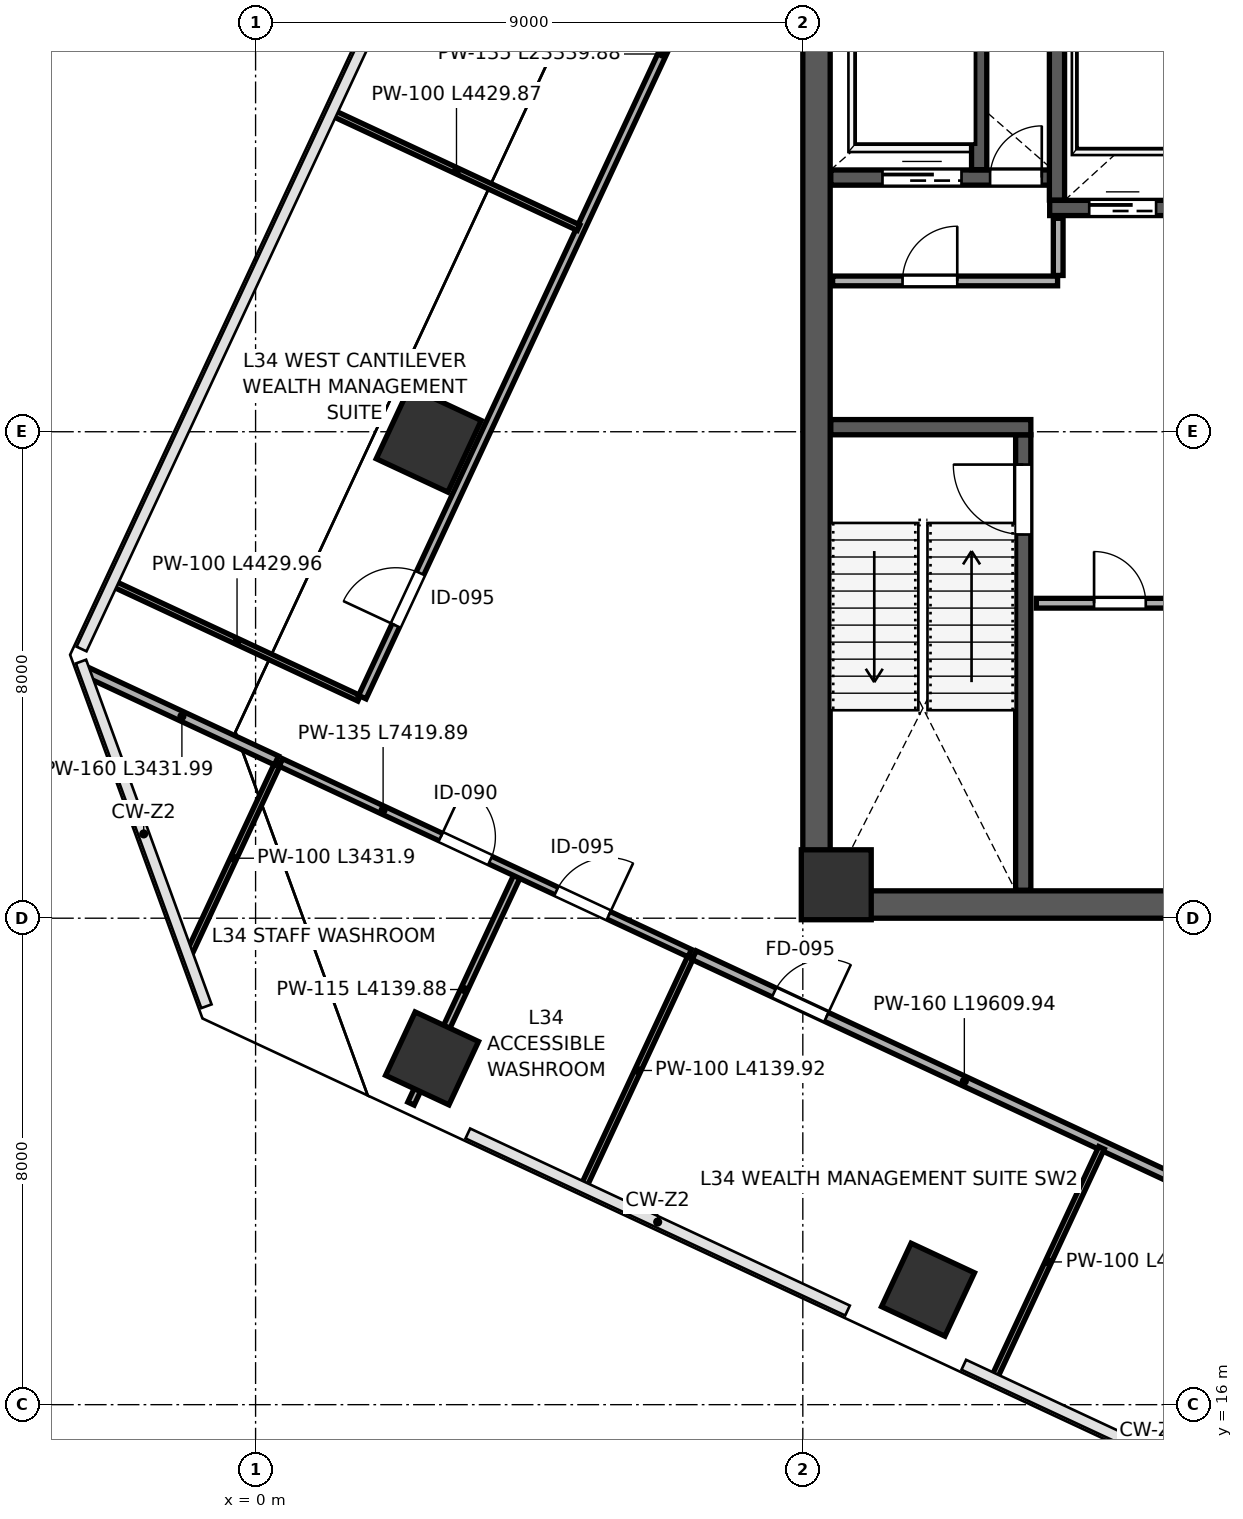
"""IFC4 building model, lengths in metres.
Left out: names, types, materials, properties, quantities, classifications, styles, units other than length and angle.
Written with IfcOpenShell. Run it as: python <this file> out.ifc"""

import sys

from ifc_helpers import new_model, si_unit, direction, frame, frame_2d, origin, origin_2d, place, context, subcontext, project, spatial, rectangle, extrude, source, transform, mapped, element, fill, save


model = new_model("IFC4")
c1 = context("Model", 3, precision=1e-05, world=origin(), true_north=direction((0.0, 1.0)))
c2 = subcontext(c1, "Body", "Model", "MODEL_VIEW")
j1 = project(units=[si_unit("LENGTHUNIT", "METRE"), si_unit("PLANEANGLEUNIT", "RADIAN")], contexts=[c1])
p1 = place(None, origin())
s1 = spatial("IfcSite", under=j1, at=p1, CompositionType="ELEMENT")
p2 = place(p1, origin())
s2 = spatial("IfcBuilding", under=s1, at=p2, CompositionType="ELEMENT")
p3 = place(p2, frame((0.0, 0.0, 154.0)))
s3 = spatial("IfcBuildingStorey", under=s2, at=p3, CompositionType="ELEMENT", Elevation=154.0)
m1 = source(origin(), c2, "Body", "SweptSolid", [
    extrude(rectangle(XDim=1.15, YDim=1.15, at=origin_2d()), origin(), (0.0, 0.0, 1.0), 4.198),
])
p4 = place(p3, frame((9.55, 24.55, 0.001), z_axis=(0.0, 0.0, 1.0), x_axis=(1.0, 0.0, 0.0)))
e1 = element("IfcColumn", 1, at=p4, inside=s3, PredefinedType="COLUMN", context=c2, shape_type="MappedRepresentation", body=[
    mapped(m1, transform((0.0, 0.0, 0.0), scale=1.0)),
])
m2 = source(origin(), c2, "Body", "SweptSolid", [
    extrude(rectangle(XDim=1.15, YDim=1.15, at=origin_2d()), origin(), (0.0, 0.0, 1.0), 4.198),
])
for number, where, z_axis, x_axis in (
    (2, (2.902, 21.694, 0.001), (0.0, 0.0, 1.0), (-0.906, 0.423, 0.0)),
    (3, (11.059, 17.891, 0.001), (0.0, 0.0, 1.0), (-0.906, 0.423, 0.0)),
):
    element("IfcColumn", number, at=place(p3, frame(where, z_axis=z_axis, x_axis=x_axis)), inside=s3, PredefinedType="COLUMN", context=c2, shape_type="MappedRepresentation", body=[
        mapped(m2, transform((0.0, 0.0, 0.0), scale=1.0)),
    ])
m3 = source(origin(), c2, "Body", "SweptSolid", [
    extrude(rectangle(XDim=1.3, YDim=1.3, at=origin_2d()), origin(), (0.0, 0.0, 1.0), 4.198),
])
p5 = place(p3, frame((2.848, 31.871, 0.001), z_axis=(0.0, 0.0, 1.0), x_axis=(-0.906307787037, 0.422618261741, 0.0)))
e4 = element("IfcColumn", 4, at=p5, inside=s3, PredefinedType="COLUMN", context=c2, shape_type="MappedRepresentation", body=[
    mapped(m3, transform((0.0, 0.0, 0.0), scale=1.0)),
])
p6 = place(p3, frame((9.225, 24.45, 0.0), z_axis=(0.0, 0.0, 1.0), x_axis=(0.0, 1.0, 0.0)))
e5 = element("IfcWall", 5, at=p6, inside=s3, PredefinedType="SHEAR", context=c2, shape_type="SweptSolid", body=[
    extrude(rectangle(XDim=15.1, YDim=0.45, at=frame_2d((7.55, 0.0))), origin(), (0.0, 0.0, 1.0), 3.96),
])
p7 = place(p3, frame((9.0, 24.225, 0.0), z_axis=(0.0, 0.0, 1.0), x_axis=(1.0, 0.0, 0.0)))
e6 = element("IfcWall", 6, at=p7, inside=s3, PredefinedType="SHEAR", context=c2, shape_type="SweptSolid", body=[
    extrude(rectangle(XDim=18.0, YDim=0.45, at=frame_2d((9.0, 0.0))), origin(), (0.0, 0.0, 1.0), 3.96),
])
p8 = place(p3, frame((12.625, 24.46, 0.0), z_axis=(0.0, 0.0, 1.0), x_axis=(0.0, 1.0, 0.0)))
e7 = element("IfcWall", 7, at=p8, inside=s3, PredefinedType="SHEAR", context=c2, shape_type="SweptSolid", body=[
    extrude(rectangle(XDim=7.49, YDim=0.25, at=frame_2d((3.745, 0.0))), origin(), (0.0, 0.0, 1.0), 3.96),
])
p9 = place(p8, frame((5.85, 0.0, 0.0)))
e8 = element("IfcOpeningElement", 8, at=p9, cuts=e7, PredefinedType="OPENING", context=c2, shape_type="SweptSolid", body=[
    extrude(rectangle(XDim=1.15, YDim=2.2, at=frame_2d((0.575, 1.1))), frame((0.0, 0.135, 0.0), z_axis=(0.0, -1.0, 0.0), x_axis=(1.0, 0.0, 0.0)), (0.0, 0.0, 1.0), 0.27),
])
p10 = place(p3, frame((9.46, 32.075, 0.0), z_axis=(0.0, 0.0, 1.0), x_axis=(1.0, 0.0, 0.0)))
e9 = element("IfcWall", 9, at=p10, inside=s3, PredefinedType="SHEAR", context=c2, shape_type="SweptSolid", body=[
    extrude(rectangle(XDim=3.29, YDim=0.25, at=frame_2d((1.645, 0.0))), origin(), (0.0, 0.0, 1.0), 3.96),
])
p11 = place(p3, frame((9.46, 36.18, 0.0), z_axis=(0.0, 0.0, 1.0), x_axis=(1.0, 0.0, 0.0)))
e10 = element("IfcWall", 10, at=p11, inside=s3, PredefinedType="SHEAR", context=c2, shape_type="SweptSolid", body=[
    extrude(rectangle(XDim=3.79, YDim=0.25, at=frame_2d((1.895, 0.0))), origin(), (0.0, 0.0, 1.0), 3.96),
])
p12 = place(p11, frame((2.62, 0.0, 0.0)))
e11 = element("IfcOpeningElement", 11, at=p12, cuts=e10, PredefinedType="OPENING", context=c2, shape_type="SweptSolid", body=[
    extrude(rectangle(XDim=0.85, YDim=2.1, at=frame_2d((0.425, 1.05))), frame((0.0, 0.135, 0.0), z_axis=(0.0, -1.0, 0.0), x_axis=(1.0, 0.0, 0.0)), (0.0, 0.0, 1.0), 0.27),
])
p13 = place(p11, frame((0.85, 0.0, 0.0)))
e12 = element("IfcOpeningElement", 12, at=p13, cuts=e10, PredefinedType="OPENING", context=c2, shape_type="SweptSolid", body=[
    extrude(rectangle(XDim=1.3, YDim=2.25, at=frame_2d((0.65, 1.125))), frame((0.0, 0.135, 0.0), z_axis=(0.0, -1.0, 0.0), x_axis=(1.0, 0.0, 0.0)), (0.0, 0.0, 1.0), 0.27),
])
p14 = place(p3, frame((11.9, 36.31, 0.0), z_axis=(0.0, 0.0, 1.0), x_axis=(0.0, 1.0, 0.0)))
e13 = element("IfcWall", 13, at=p14, inside=s3, PredefinedType="SHEAR", context=c2, shape_type="SweptSolid", body=[
    extrude(rectangle(XDim=3.23, YDim=0.25, at=frame_2d((1.615, 0.0))), origin(), (0.0, 0.0, 1.0), 3.96),
])
p15 = place(p3, frame((13.06, 35.68, 0.0), z_axis=(0.0, 0.0, 1.0), x_axis=(1.0, 0.0, 0.0)))
e14 = element("IfcWall", 14, at=p15, inside=s3, PredefinedType="SHEAR", context=c2, shape_type="SweptSolid", body=[
    extrude(rectangle(XDim=4.25, YDim=0.25, at=frame_2d((2.125, 0.0))), origin(), (0.0, 0.0, 1.0), 3.96),
])
p16 = place(p15, frame((0.65, 0.0, 0.0)))
e15 = element("IfcOpeningElement", 15, at=p16, cuts=e14, PredefinedType="OPENING", context=c2, shape_type="SweptSolid", body=[
    extrude(rectangle(XDim=1.1, YDim=2.2, at=frame_2d((0.55, 1.1))), frame((0.0, 0.135, 0.0), z_axis=(0.0, -1.0, 0.0), x_axis=(1.0, 0.0, 0.0)), (0.0, 0.0, 1.0), 0.27),
])
p17 = place(p15, frame((2.65, 0.0, 0.0)))
e16 = element("IfcOpeningElement", 16, at=p17, cuts=e14, PredefinedType="OPENING", context=c2, shape_type="SweptSolid", body=[
    extrude(rectangle(XDim=1.1, YDim=2.2, at=frame_2d((0.55, 1.1))), frame((0.0, 0.135, 0.0), z_axis=(0.0, -1.0, 0.0), x_axis=(1.0, 0.0, 0.0)), (0.0, 0.0, 1.0), 0.27),
])
p18 = place(p3, frame((13.18, 35.81, 0.0), z_axis=(0.0, 0.0, 1.0), x_axis=(0.0, 1.0, 0.0)))
e17 = element("IfcWall", 17, at=p18, inside=s3, PredefinedType="SHEAR", context=c2, shape_type="SweptSolid", body=[
    extrude(rectangle(XDim=3.73, YDim=0.25, at=frame_2d((1.865, 0.0))), origin(), (0.0, 0.0, 1.0), 3.96),
])
p19 = place(p3, frame((9.49, 34.48, 0.0), z_axis=(0.0, 0.0, 1.0), x_axis=(1.0, 0.0, 0.0)))
e18 = element("IfcWall", 18, at=p19, inside=s3, PredefinedType="PARTITIONING", context=c2, shape_type="SweptSolid", body=[
    extrude(rectangle(XDim=3.7, YDim=0.16, at=frame_2d((1.85, 0.0))), origin(), (0.0, 0.0, 1.0), 3.96),
])
p20 = place(p19, frame((1.15, 0.0, 0.0)))
e19 = element("IfcOpeningElement", 19, at=p20, cuts=e18, PredefinedType="OPENING", context=c2, shape_type="SweptSolid", body=[
    extrude(rectangle(XDim=0.9, YDim=2.15, at=frame_2d((0.45, 1.075))), frame((0.0, 0.09, 0.0), z_axis=(0.0, -1.0, 0.0), x_axis=(1.0, 0.0, 0.0)), (0.0, 0.0, 1.0), 0.18),
])
p21 = place(p3, frame((13.2, 34.57, 0.0), z_axis=(0.0, 0.0, 1.0), x_axis=(0.0, 1.0, 0.0)))
e20 = element("IfcWall", 20, at=p21, inside=s3, PredefinedType="PARTITIONING", context=c2, shape_type="SweptSolid", body=[
    extrude(rectangle(XDim=0.94, YDim=0.16, at=frame_2d((0.47, 0.0))), origin(), (0.0, 0.0, 1.0), 3.96),
])
p22 = place(p3, frame((12.84, 29.18, 0.0), z_axis=(0.0, 0.0, 1.0), x_axis=(1.0, 0.0, 0.0)))
e21 = element("IfcWall", 21, at=p22, inside=s3, PredefinedType="PARTITIONING", context=c2, shape_type="SweptSolid", body=[
    extrude(rectangle(XDim=8.37, YDim=0.16, at=frame_2d((4.185, 0.0))), origin(), (0.0, 0.0, 1.0), 3.96),
])
p23 = place(p22, frame((0.95, 0.0, 0.0)))
e22 = element("IfcOpeningElement", 22, at=p23, cuts=e21, PredefinedType="OPENING", context=c2, shape_type="SweptSolid", body=[
    extrude(rectangle(XDim=0.85, YDim=2.1, at=frame_2d((0.425, 1.05))), frame((0.0, 0.09, 0.0), z_axis=(0.0, -1.0, 0.0), x_axis=(1.0, 0.0, 0.0)), (0.0, 0.0, 1.0), 0.18),
])
p24 = place(p22, frame((4.2, 0.0, 0.0)))
e23 = element("IfcOpeningElement", 23, at=p24, cuts=e21, PredefinedType="OPENING", context=c2, shape_type="SweptSolid", body=[
    extrude(rectangle(XDim=0.85, YDim=2.1, at=frame_2d((0.425, 1.05))), frame((0.0, 0.09, 0.0), z_axis=(0.0, -1.0, 0.0), x_axis=(1.0, 0.0, 0.0)), (0.0, 0.0, 1.0), 0.18),
])
p25 = place(p3, frame((-1.088, 23.431, 0.0), z_axis=(0.0, 0.0, 1.0), x_axis=(0.422632310917, 0.906301235665, 0.0)))
e24 = element("IfcWall", 24, at=p25, inside=s3, PredefinedType="PARTITIONING", context=c2, shape_type="SweptSolid", body=[
    extrude(rectangle(XDim=3.432, YDim=0.1, at=frame_2d((1.716, 0.0))), origin(), (0.0, 0.0, 1.0), 3.96),
])
p26 = place(p3, frame((-2.767, 28.045, 0.0), z_axis=(0.0, 0.0, 1.0), x_axis=(0.906313941013, -0.422605064246, 0.0)))
e25 = element("IfcWall", 25, at=p26, inside=s3, PredefinedType="PARTITIONING", context=c2, shape_type="SweptSolid", body=[
    extrude(rectangle(XDim=3.432, YDim=0.16, at=frame_2d((1.716, 0.0))), origin(), (0.0, 0.0, 1.0), 3.96),
])
p27 = place(p3, frame((2.556, 20.951, 0.0), z_axis=(0.0, 0.0, 1.0), x_axis=(0.422607794095, 0.906312668106, 0.0)))
e26 = element("IfcWall", 26, at=p27, inside=s3, PredefinedType="PARTITIONING", context=c2, shape_type="SweptSolid", body=[
    extrude(rectangle(XDim=4.14, YDim=0.115, at=frame_2d((2.07, 0.0))), origin(), (0.0, 0.0, 1.0), 3.195),
])
p28 = place(p3, frame((5.41, 19.62, 0.0), z_axis=(0.0, 0.0, 1.0), x_axis=(0.422656233697, 0.906290079454, 0.0)))
e27 = element("IfcWall", 27, at=p28, inside=s3, PredefinedType="PARTITIONING", context=c2, shape_type="SweptSolid", body=[
    extrude(rectangle(XDim=4.14, YDim=0.1, at=frame_2d((2.07, 0.0))), origin(), (0.0, 0.0, 1.0), 3.195),
])
p29 = place(p3, frame((0.416, 26.561, 0.0), z_axis=(0.0, 0.0, 1.0), x_axis=(0.906307511488, -0.422618852656, 0.0)))
e28 = element("IfcWall", 28, at=p29, inside=s3, PredefinedType="PARTITIONING", context=c2, shape_type="SweptSolid", body=[
    extrude(rectangle(XDim=7.42, YDim=0.135, at=frame_2d((3.71, 0.0))), origin(), (0.0, 0.0, 1.0), 3.96),
])
p30 = place(p29, frame((2.9, 0.0, 0.0)))
e29 = element("IfcOpeningElement", 29, at=p30, cuts=e28, PredefinedType="OPENING", context=c2, shape_type="SweptSolid", body=[
    extrude(rectangle(XDim=0.9, YDim=2.15, at=frame_2d((0.45, 1.075))), frame((0.0, 0.078, 0.0), z_axis=(0.0, -1.0, 0.0), x_axis=(1.0, 0.0, 0.0)), (0.0, 0.0, 1.0), 0.155),
])
p31 = place(p29, frame((5.0, 0.0, 0.0)))
e30 = element("IfcOpeningElement", 30, at=p31, cuts=e28, PredefinedType="OPENING", context=c2, shape_type="SweptSolid", body=[
    extrude(rectangle(XDim=0.95, YDim=2.15, at=frame_2d((0.475, 1.075))), frame((0.0, 0.078, 0.0), z_axis=(0.0, -1.0, 0.0), x_axis=(1.0, 0.0, 0.0)), (0.0, 0.0, 1.0), 0.155),
])
p32 = place(p3, frame((7.213, 23.391, 0.0), z_axis=(0.0, 0.0, 1.0), x_axis=(0.906304602938, -0.422625089996, 0.0)))
e31 = element("IfcWall", 31, at=p32, inside=s3, PredefinedType="PARTITIONING", context=c2, shape_type="SweptSolid", body=[
    extrude(rectangle(XDim=19.61, YDim=0.16, at=frame_2d((9.805, 0.0))), origin(), (0.0, 0.0, 1.0), 3.96),
])
p33 = place(p32, frame((1.45, 0.0, 0.0)))
e32 = element("IfcOpeningElement", 32, at=p33, cuts=e31, PredefinedType="OPENING", context=c2, shape_type="SweptSolid", body=[
    extrude(rectangle(XDim=0.95, YDim=2.15, at=frame_2d((0.475, 1.075))), frame((0.0, 0.09, 0.0), z_axis=(0.0, -1.0, 0.0), x_axis=(1.0, 0.0, 0.0)), (0.0, 0.0, 1.0), 0.18),
])
p34 = place(p32, frame((8.7, 0.0, 0.0)))
e33 = element("IfcOpeningElement", 33, at=p34, cuts=e31, PredefinedType="OPENING", context=c2, shape_type="SweptSolid", body=[
    extrude(rectangle(XDim=0.95, YDim=2.15, at=frame_2d((0.475, 1.075))), frame((0.0, 0.09, 0.0), z_axis=(0.0, -1.0, 0.0), x_axis=(1.0, 0.0, 0.0)), (0.0, 0.0, 1.0), 0.18),
])
p35 = place(p3, frame((12.162, 16.471, 0.0), z_axis=(0.0, 0.0, 1.0), x_axis=(0.422656233697, 0.906290079454, 0.0)))
e34 = element("IfcWall", 34, at=p35, inside=s3, PredefinedType="PARTITIONING", context=c2, shape_type="SweptSolid", body=[
    extrude(rectangle(XDim=4.14, YDim=0.1, at=frame_2d((2.07, 0.0))), origin(), (0.0, 0.0, 1.0), 3.195),
])
p36 = place(p3, frame((11.673, 48.808, 0.0), z_axis=(0.0, 0.0, 1.0), x_axis=(0.906307085664, -0.422619765836, 0.0)))
e35 = element("IfcWall", 35, at=p36, inside=s3, PredefinedType="PARTITIONING", context=c2, shape_type="SweptSolid", body=[
    extrude(rectangle(XDim=26.31, YDim=0.135, at=frame_2d((13.155, 0.0))), origin(), (0.0, 0.0, 1.0), 3.96),
])
p37 = place(p36, frame((2.1, 0.0, 0.0)))
e36 = element("IfcOpeningElement", 36, at=p37, cuts=e35, PredefinedType="OPENING", context=c2, shape_type="SweptSolid", body=[
    extrude(rectangle(XDim=0.95, YDim=2.15, at=frame_2d((0.475, 1.075))), frame((0.0, 0.078, 0.0), z_axis=(0.0, -1.0, 0.0), x_axis=(1.0, 0.0, 0.0)), (0.0, 0.0, 1.0), 0.155),
])
p38 = place(p36, frame((18.2, 0.0, 0.0)))
e37 = element("IfcOpeningElement", 37, at=p38, cuts=e35, PredefinedType="OPENING", context=c2, shape_type="SweptSolid", body=[
    extrude(rectangle(XDim=0.95, YDim=2.15, at=frame_2d((0.475, 1.075))), frame((0.0, 0.078, 0.0), z_axis=(0.0, -1.0, 0.0), x_axis=(1.0, 0.0, 0.0)), (0.0, 0.0, 1.0), 0.155),
])
p39 = place(p3, frame((-2.312, 29.488, 0.0), z_axis=(0.0, 0.0, 1.0), x_axis=(0.906316851894, -0.422598821546, 0.0)))
e38 = element("IfcWall", 38, at=p39, inside=s3, PredefinedType="PARTITIONING", context=c2, shape_type="SweptSolid", body=[
    extrude(rectangle(XDim=4.43, YDim=0.1, at=frame_2d((2.215, 0.0))), origin(), (0.0, 0.0, 1.0), 3.96),
])
p40 = place(p3, frame((1.756, 27.635, 0.0), z_axis=(0.0, 0.0, 1.0), x_axis=(0.422615732035, 0.906308966653, 0.0)))
e39 = element("IfcWall", 39, at=p40, inside=s3, PredefinedType="PARTITIONING", context=c2, shape_type="SweptSolid", body=[
    extrude(rectangle(XDim=23.34, YDim=0.135, at=frame_2d((11.67, 0.0))), origin(), (0.0, 0.0, 1.0), 3.96),
])
p41 = place(p40, frame((1.3, 0.0, 0.0)))
e40 = element("IfcOpeningElement", 40, at=p41, cuts=e39, PredefinedType="OPENING", context=c2, shape_type="SweptSolid", body=[
    extrude(rectangle(XDim=0.95, YDim=2.15, at=frame_2d((0.475, 1.075))), frame((0.0, 0.078, 0.0), z_axis=(0.0, -1.0, 0.0), x_axis=(1.0, 0.0, 0.0)), (0.0, 0.0, 1.0), 0.155),
])
p42 = place(p40, frame((14.2, 0.0, 0.0)))
e41 = element("IfcOpeningElement", 41, at=p42, cuts=e39, PredefinedType="OPENING", context=c2, shape_type="SweptSolid", body=[
    extrude(rectangle(XDim=0.95, YDim=2.15, at=frame_2d((0.475, 1.075))), frame((0.0, 0.078, 0.0), z_axis=(0.0, -1.0, 0.0), x_axis=(1.0, 0.0, 0.0)), (0.0, 0.0, 1.0), 0.155),
])
p43 = place(p3, frame((1.297, 37.228, 0.0), z_axis=(0.0, 0.0, 1.0), x_axis=(0.906295742894, -0.422644089526, 0.0)))
e42 = element("IfcWall", 42, at=p43, inside=s3, PredefinedType="PARTITIONING", context=c2, shape_type="SweptSolid", body=[
    extrude(rectangle(XDim=4.43, YDim=0.1, at=frame_2d((2.215, 0.0))), origin(), (0.0, 0.0, 1.0), 3.195),
])
m4 = source(origin(), c2, "Body", "SweptSolid", [
    extrude(rectangle(XDim=1.15, YDim=2.2, at=frame_2d((0.575, 1.1))), frame((0.0, 0.025, 0.0), z_axis=(0.0, -1.0, 0.0), x_axis=(1.0, 0.0, 0.0)), (0.0, 0.0, 1.0), 0.05),
])
p44 = place(p9, origin())
e43 = element("IfcDoor", 43, at=p44, inside=s3, OperationType="SINGLE_SWING_RIGHT", PredefinedType="DOOR", context=c2, shape_type="MappedRepresentation", body=[
    mapped(m4, transform((0.0, 0.0, 0.0), scale=1.0)),
])
fill(e8, e43)
m5 = source(origin(), c2, "Body", "SweptSolid", [
    extrude(rectangle(XDim=0.85, YDim=2.1, at=frame_2d((0.425, 1.05))), frame((0.0, 0.025, 0.0), z_axis=(0.0, -1.0, 0.0), x_axis=(1.0, 0.0, 0.0)), (0.0, 0.0, 1.0), 0.05),
])
p45 = place(p12, origin())
e44 = element("IfcDoor", 44, at=p45, inside=s3, OperationType="SINGLE_SWING_RIGHT", PredefinedType="DOOR", context=c2, shape_type="MappedRepresentation", body=[
    mapped(m5, transform((0.0, 0.0, 0.0), scale=1.0)),
])
fill(e11, e44)
m6 = source(origin(), c2, "Body", "SweptSolid", [
    extrude(rectangle(XDim=1.1, YDim=2.2, at=frame_2d((0.55, 1.1))), frame((0.0, 0.025, 0.0), z_axis=(0.0, -1.0, 0.0), x_axis=(1.0, 0.0, 0.0)), (0.0, 0.0, 1.0), 0.05),
])
p46 = place(p16, origin())
e45 = element("IfcDoor", 45, at=p46, inside=s3, OperationType="SLIDING_TO_LEFT", PredefinedType="DOOR", context=c2, shape_type="MappedRepresentation", body=[
    mapped(m6, transform((0.0, 0.0, 0.0), scale=1.0)),
])
fill(e15, e45)
m7 = source(origin(), c2, "Body", "SweptSolid", [
    extrude(rectangle(XDim=1.3, YDim=2.25, at=frame_2d((0.65, 1.125))), frame((0.0, 0.025, 0.0), z_axis=(0.0, -1.0, 0.0), x_axis=(1.0, 0.0, 0.0)), (0.0, 0.0, 1.0), 0.05),
])
p47 = place(p13, origin())
e46 = element("IfcDoor", 46, at=p47, inside=s3, OperationType="SLIDING_TO_LEFT", PredefinedType="DOOR", context=c2, shape_type="MappedRepresentation", body=[
    mapped(m7, transform((0.0, 0.0, 0.0), scale=1.0)),
])
fill(e12, e46)
m8 = source(origin(), c2, "Body", "SweptSolid", [
    extrude(rectangle(XDim=0.9, YDim=2.15, at=frame_2d((0.45, 1.075))), frame((0.0, 0.025, 0.0), z_axis=(0.0, -1.0, 0.0), x_axis=(1.0, 0.0, 0.0)), (0.0, 0.0, 1.0), 0.05),
])
p48 = place(p20, origin())
e47 = element("IfcDoor", 47, at=p48, inside=s3, OperationType="SINGLE_SWING_RIGHT", PredefinedType="DOOR", context=c2, shape_type="MappedRepresentation", body=[
    mapped(m8, transform((0.0, 0.0, 0.0), scale=1.0)),
])
fill(e19, e47)
p49 = place(p23, origin())
e48 = element("IfcDoor", 48, at=p49, inside=s3, OperationType="SINGLE_SWING_LEFT", PredefinedType="DOOR", context=c2, shape_type="MappedRepresentation", body=[
    mapped(m5, transform((0.0, 0.0, 0.0), scale=1.0)),
])
fill(e22, e48)
m9 = source(origin(), c2, "Body", "SweptSolid", [
    extrude(rectangle(XDim=0.9, YDim=2.15, at=frame_2d((0.45, 1.075))), frame((0.0, 0.025, 0.0), z_axis=(0.0, -1.0, 0.0), x_axis=(1.0, 0.0, 0.0)), (0.0, 0.0, 1.0), 0.05),
])
p50 = place(p30, origin())
e49 = element("IfcDoor", 49, at=p50, inside=s3, OperationType="SINGLE_SWING_LEFT", PredefinedType="DOOR", context=c2, shape_type="MappedRepresentation", body=[
    mapped(m9, transform((0.0, 0.0, 0.0), scale=1.0)),
])
fill(e29, e49)
m10 = source(origin(), c2, "Body", "SweptSolid", [
    extrude(rectangle(XDim=0.95, YDim=2.15, at=frame_2d((0.475, 1.075))), frame((0.0, 0.025, 0.0), z_axis=(0.0, -1.0, 0.0), x_axis=(1.0, 0.0, 0.0)), (0.0, 0.0, 1.0), 0.05),
])
p51 = place(p31, origin())
e50 = element("IfcDoor", 50, at=p51, inside=s3, OperationType="SINGLE_SWING_RIGHT", PredefinedType="DOOR", context=c2, shape_type="MappedRepresentation", body=[
    mapped(m10, transform((0.0, 0.0, 0.0), scale=1.0)),
])
fill(e30, e50)
m11 = source(origin(), c2, "Body", "SweptSolid", [
    extrude(rectangle(XDim=0.95, YDim=2.15, at=frame_2d((0.475, 1.075))), frame((0.0, 0.025, 0.0), z_axis=(0.0, -1.0, 0.0), x_axis=(1.0, 0.0, 0.0)), (0.0, 0.0, 1.0), 0.05),
])
p52 = place(p33, origin())
e51 = element("IfcDoor", 51, at=p52, inside=s3, OperationType="SINGLE_SWING_RIGHT", PredefinedType="DOOR", context=c2, shape_type="MappedRepresentation", body=[
    mapped(m11, transform((0.0, 0.0, 0.0), scale=1.0)),
])
fill(e32, e51)
p53 = place(p41, origin())
e52 = element("IfcDoor", 52, at=p53, inside=s3, OperationType="SINGLE_SWING_LEFT", PredefinedType="DOOR", context=c2, shape_type="MappedRepresentation", body=[
    mapped(m10, transform((0.0, 0.0, 0.0), scale=1.0)),
])
fill(e40, e52)
save(model, sys.argv[1])
